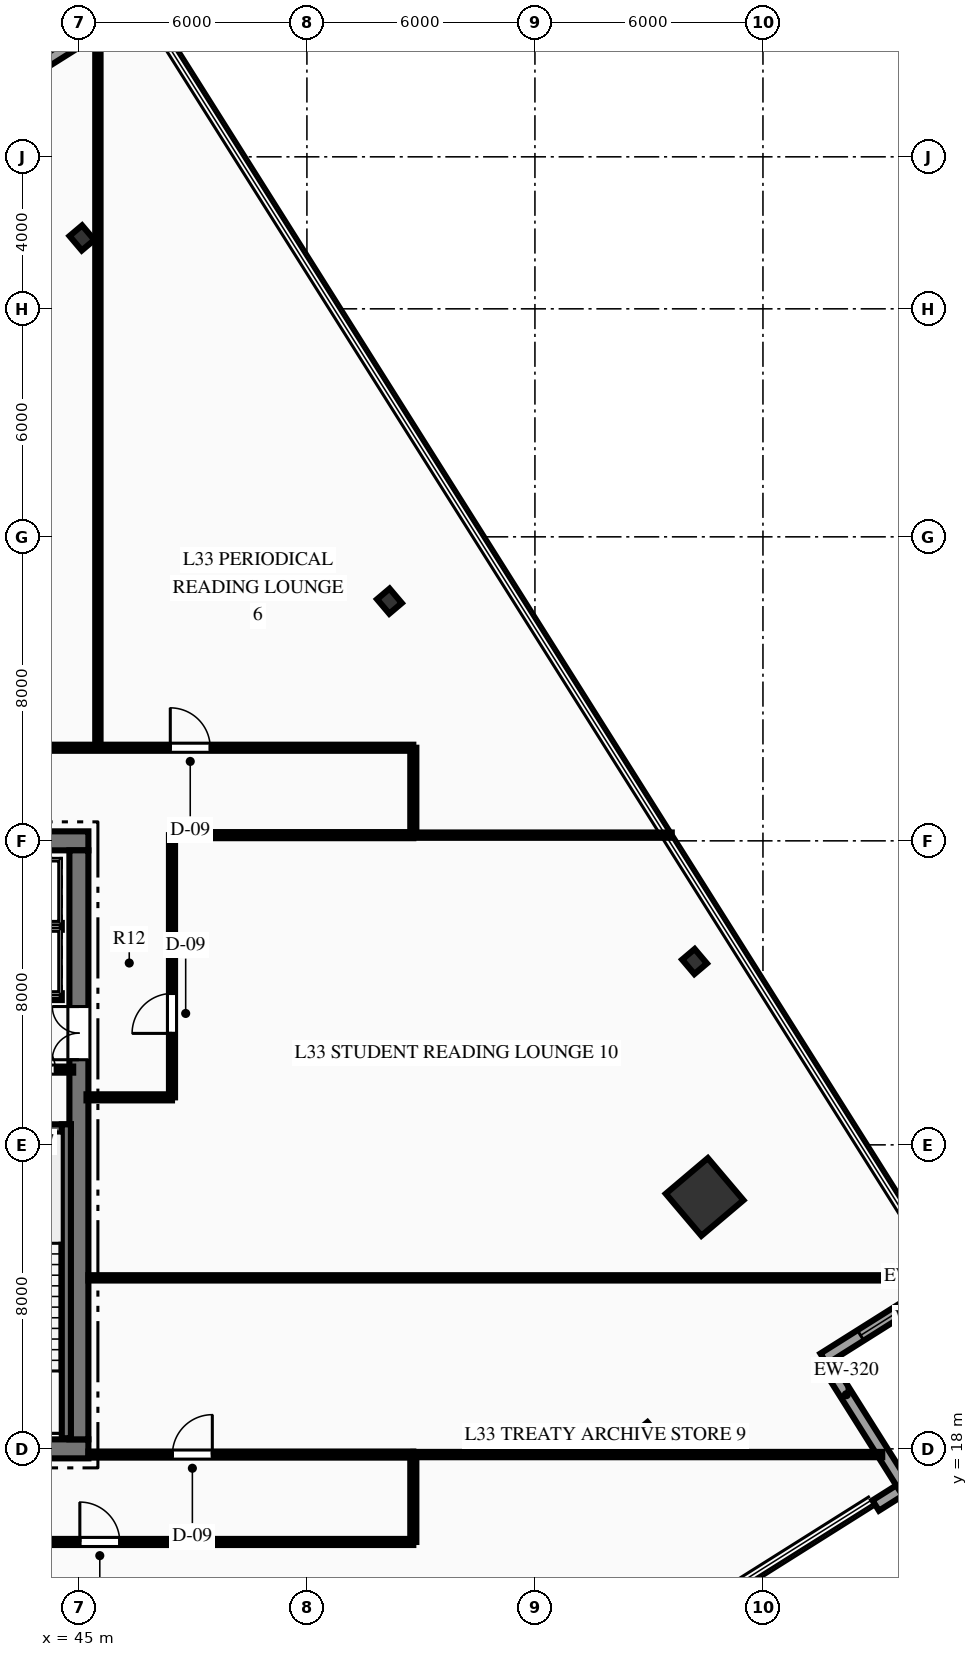
"""IFC4 building model, lengths in metres.
Left out: names, types, materials, properties, quantities, classifications, styles, units other than length and angle.
Written with IfcOpenShell. Run it as: python <this file> out.ifc"""

import sys

from ifc_helpers import new_model, si_unit, direction, frame, frame_2d, origin, origin_2d, place, context, subcontext, project, spatial, rectangle, hollow_rectangle, i_section, extrude, element, fill, save


model = new_model("IFC4")
c1 = context("Model", 3, precision=1e-05, world=origin(), true_north=direction((0.0, 1.0)))
c2 = subcontext(c1, "Body", "Model", "MODEL_VIEW")
j1 = project(units=[si_unit("LENGTHUNIT", "METRE"), si_unit("PLANEANGLEUNIT", "RADIAN")], contexts=[c1])
p1 = place(None, origin())
s1 = spatial("IfcSite", under=j1, at=p1, CompositionType="ELEMENT")
p2 = place(p1, origin())
s2 = spatial("IfcBuilding", under=s1, at=p2, CompositionType="ELEMENT")
p3 = place(p2, frame((0.0, 0.0, 136.2)))
s3 = spatial("IfcBuildingStorey", under=s2, at=p3, CompositionType="ELEMENT", Elevation=136.2)
p4 = place(p3, frame((26.75, 18.0, 0.0), z_axis=(0.0, 0.0, 1.0), x_axis=(1.0, 0.0, 0.0)))
e1 = element("IfcWall", 1, at=p4, inside=s3, PredefinedType="SHEAR", context=c2, shape_type="SweptSolid", body=[
    extrude(rectangle(XDim=18.5, YDim=0.5, at=frame_2d((9.25, 0.0))), origin(), (0.0, 0.0, 1.0), 4.5),
])
p5 = place(p4, frame((7.35, 0.0, 0.0)))
e2 = element("IfcOpeningElement", 2, at=p5, cuts=e1, PredefinedType="OPENING", context=c2, shape_type="SweptSolid", body=[
    extrude(rectangle(XDim=1.1, YDim=2.15, at=frame_2d((0.55, 1.075))), frame((0.0, 0.26, 0.0), z_axis=(0.0, -1.0, 0.0), x_axis=(1.0, 0.0, 0.0)), (0.0, 0.0, 1.0), 0.52),
])
p6 = place(p4, frame((10.05, 0.0, 0.0)))
e3 = element("IfcOpeningElement", 3, at=p6, cuts=e1, PredefinedType="OPENING", context=c2, shape_type="SweptSolid", body=[
    extrude(rectangle(XDim=1.1, YDim=2.15, at=frame_2d((0.55, 1.075))), frame((0.0, 0.26, 0.0), z_axis=(0.0, -1.0, 0.0), x_axis=(1.0, 0.0, 0.0)), (0.0, 0.0, 1.0), 0.52),
])
p7 = place(p3, frame((26.75, 34.0, 0.0), z_axis=(0.0, 0.0, 1.0), x_axis=(1.0, 0.0, 0.0)))
e4 = element("IfcWall", 4, at=p7, inside=s3, PredefinedType="SHEAR", context=c2, shape_type="SweptSolid", body=[
    extrude(rectangle(XDim=18.5, YDim=0.5, at=frame_2d((9.25, 0.0))), origin(), (0.0, 0.0, 1.0), 4.5),
])
p8 = place(p7, frame((13.935, 0.0, 0.0)))
e5 = element("IfcOpeningElement", 5, at=p8, cuts=e4, PredefinedType="OPENING", context=c2, shape_type="SweptSolid", body=[
    extrude(rectangle(XDim=1.1, YDim=2.15, at=frame_2d((0.55, 1.075))), frame((0.0, 0.26, 0.0), z_axis=(0.0, -1.0, 0.0), x_axis=(1.0, 0.0, 0.0)), (0.0, 0.0, 1.0), 0.52),
])
p9 = place(p7, frame((16.185, 0.0, 0.0)))
e6 = element("IfcOpeningElement", 6, at=p9, cuts=e4, PredefinedType="OPENING", context=c2, shape_type="SweptSolid", body=[
    extrude(rectangle(XDim=1.1, YDim=2.15, at=frame_2d((0.55, 1.075))), frame((0.0, 0.26, 0.0), z_axis=(0.0, -1.0, 0.0), x_axis=(1.0, 0.0, 0.0)), (0.0, 0.0, 1.0), 0.52),
])
p10 = place(p3, frame((45.0, 18.25, 0.0), z_axis=(0.0, 0.0, 1.0), x_axis=(0.0, 1.0, 0.0)))
e7 = element("IfcWall", 7, at=p10, inside=s3, PredefinedType="SHEAR", context=c2, shape_type="SweptSolid", body=[
    extrude(rectangle(XDim=15.5, YDim=0.5, at=frame_2d((7.75, 0.0))), origin(), (0.0, 0.0, 1.0), 4.5),
])
p11 = place(p10, frame((9.99, 0.0, 0.0)))
e8 = element("IfcOpeningElement", 8, at=p11, cuts=e7, PredefinedType="OPENING", context=c2, shape_type="SweptSolid", body=[
    extrude(rectangle(XDim=1.4, YDim=2.2, at=frame_2d((0.7, 1.1))), frame((0.0, 0.26, 0.0), z_axis=(0.0, -1.0, 0.0), x_axis=(1.0, 0.0, 0.0)), (0.0, 0.0, 1.0), 0.52),
])
p12 = place(p3, frame((40.81, 26.42, 0.0), z_axis=(0.0, 0.0, 1.0), x_axis=(1.0, 0.0, 0.0)))
e9 = element("IfcWall", 9, at=p12, inside=s3, PredefinedType="SHEAR", context=c2, shape_type="SweptSolid", body=[
    extrude(rectangle(XDim=3.98, YDim=0.24, at=frame_2d((1.99, 0.0))), origin(), (0.0, 0.0, 1.0), 4.5),
])
p13 = place(p3, frame((44.67, 18.28, 0.0), z_axis=(0.0, 0.0, 1.0), x_axis=(0.0, 1.0, 0.0)))
e10 = element("IfcWall", 10, at=p13, inside=s3, PredefinedType="SHEAR", context=c2, shape_type="SweptSolid", body=[
    extrude(rectangle(XDim=8.26, YDim=0.24, at=frame_2d((4.13, 0.0))), origin(), (0.0, 0.0, 1.0), 4.5),
])
p14 = place(p3, frame((61.465, 24.629, 0.0), z_axis=(0.0, 0.0, 1.0), x_axis=(0.763232469783, 0.646123979643, 0.0)))
e11 = element("IfcColumn", 11, at=p14, inside=s3, PredefinedType="COLUMN", context=c2, shape_type="SweptSolid", body=[
    extrude(hollow_rectangle(XDim=1.45, YDim=1.45, WallThickness=0.07, at=origin_2d()), origin(), (0.0, 0.0, 1.0), 4.5),
])
for number, where, z_axis, x_axis in (
    (12, (59.956, 18.373, 0.0), (0.0, 0.0, 1.0), (0.763, 0.646, 0.0)),
    (13, (61.199, 30.824, 0.0), (0.0, 0.0, 1.0), (0.763, 0.646, 0.0)),
    (14, (53.171, 40.307, 0.0), (0.0, 0.0, 1.0), (0.763, 0.646, 0.0)),
    (15, (45.08, 49.865, 0.0), (0.0, 0.0, 1.0), (0.763, 0.646, 0.0)),
):
    element("IfcColumn", number, at=place(p3, frame(where, z_axis=z_axis, x_axis=x_axis)), inside=s3, PredefinedType="COLUMN", context=c2, shape_type="SweptSolid", body=[
        extrude(i_section(OverallWidth=0.432, OverallDepth=0.498, WebThickness=0.056, FlangeThickness=0.089, at=origin_2d()), origin(), (0.0, 0.0, 1.0), 4.5),
    ])
p15 = place(p3, frame((66.728, 16.988, 0.0), z_axis=(0.0, 0.0, 1.0), x_axis=(-0.846210185892, -0.532849248186, 0.0)))
e16 = element("IfcWall", 16, at=p15, inside=s3, PredefinedType="STANDARD", context=c2, shape_type="SweptSolid", body=[
    extrude(rectangle(XDim=0.9, YDim=0.32, at=frame_2d((0.45, 0.0))), origin(), (0.0, 0.0, 1.0), 4.21),
])
p16 = place(p3, frame((64.597, 20.373, 0.0), z_axis=(0.0, 0.0, 1.0), x_axis=(0.532892588268, -0.846182893569, 0.0)))
e17 = element("IfcWall", 17, at=p16, inside=s3, PredefinedType="STANDARD", context=c2, shape_type="SweptSolid", body=[
    extrude(rectangle(XDim=4.0, YDim=0.32, at=frame_2d((2.0, 0.0))), origin(), (0.0, 0.0, 1.0), 4.21),
])
p17 = place(p3, frame((67.982, 22.505, 0.0), z_axis=(0.0, 0.0, 1.0), x_axis=(-0.846200224481, -0.532865067432, 0.0)))
e18 = element("IfcWall", 18, at=p17, inside=s3, PredefinedType="STANDARD", context=c2, shape_type="SweptSolid", body=[
    extrude(rectangle(XDim=4.0, YDim=0.32, at=frame_2d((2.0, 0.0))), origin(), (0.0, 0.0, 1.0), 4.21),
])
p18 = place(p17, frame((1.15, 0.0, 0.75)))
e19 = element("IfcOpeningElement", 19, at=p18, cuts=e18, PredefinedType="OPENING", context=c2, shape_type="SweptSolid", body=[
    extrude(rectangle(XDim=1.7, YDim=2.5, at=frame_2d((0.85, 1.25))), frame((0.0, 0.17, 0.0), z_axis=(0.0, -1.0, 0.0), x_axis=(1.0, 0.0, 0.0)), (0.0, 0.0, 1.0), 0.34),
])
p19 = place(p3, frame((43.388, 54.052, 0.0), z_axis=(0.0, 0.0, 1.0), x_axis=(0.846200224481, 0.532865067432, 0.0)))
e20 = element("IfcWall", 20, at=p19, inside=s3, PredefinedType="STANDARD", context=c2, shape_type="SweptSolid", body=[
    extrude(rectangle(XDim=4.0, YDim=0.32, at=frame_2d((2.0, 0.0))), origin(), (0.0, 0.0, 1.0), 4.21),
])
p20 = place(p3, frame((40.8, 27.98, 0.0), z_axis=(0.0, 0.0, 1.0), x_axis=(1.0, 0.0, 0.0)))
e21 = element("IfcWall", 21, at=p20, inside=s3, PredefinedType="PARTITIONING", context=c2, shape_type="SweptSolid", body=[
    extrude(rectangle(XDim=4.05, YDim=0.16, at=frame_2d((2.025, 0.0))), origin(), (0.0, 0.0, 1.0), 4.21),
])
p21 = place(p20, frame((0.77, 0.0, 0.0)))
e22 = element("IfcOpeningElement", 22, at=p21, cuts=e21, PredefinedType="OPENING", context=c2, shape_type="SweptSolid", body=[
    extrude(rectangle(XDim=0.9, YDim=2.15, at=frame_2d((0.45, 1.075))), frame((0.0, 0.09, 0.0), z_axis=(0.0, -1.0, 0.0), x_axis=(1.0, 0.0, 0.0)), (0.0, 0.0, 1.0), 0.18),
])
p22 = place(p20, frame((2.68, 0.0, 0.0)))
e23 = element("IfcOpeningElement", 23, at=p22, cuts=e21, PredefinedType="OPENING", context=c2, shape_type="SweptSolid", body=[
    extrude(rectangle(XDim=0.9, YDim=2.15, at=frame_2d((0.45, 1.075))), frame((0.0, 0.09, 0.0), z_axis=(0.0, -1.0, 0.0), x_axis=(1.0, 0.0, 0.0)), (0.0, 0.0, 1.0), 0.18),
])
p23 = place(p3, frame((40.12, 29.9, 0.0), z_axis=(0.0, 0.0, 1.0), x_axis=(1.0, 0.0, 0.0)))
e24 = element("IfcWall", 24, at=p23, inside=s3, PredefinedType="PARTITIONING", context=c2, shape_type="SweptSolid", body=[
    extrude(rectangle(XDim=4.43, YDim=0.18, at=frame_2d((2.215, 0.0))), origin(), (0.0, 0.0, 1.0), 4.21),
])
p24 = place(p23, frame((0.565, 0.0, 0.0)))
e25 = element("IfcOpeningElement", 25, at=p24, cuts=e24, PredefinedType="OPENING", context=c2, shape_type="SweptSolid", body=[
    extrude(rectangle(XDim=1.1, YDim=2.15, at=frame_2d((0.55, 1.075))), frame((0.0, 0.1, 0.0), z_axis=(0.0, -1.0, 0.0), x_axis=(1.0, 0.0, 0.0)), (0.0, 0.0, 1.0), 0.2),
])
p25 = place(p23, frame((2.815, 0.0, 0.0)))
e26 = element("IfcOpeningElement", 26, at=p25, cuts=e24, PredefinedType="OPENING", context=c2, shape_type="SweptSolid", body=[
    extrude(rectangle(XDim=1.1, YDim=2.15, at=frame_2d((0.55, 1.075))), frame((0.0, 0.1, 0.0), z_axis=(0.0, -1.0, 0.0), x_axis=(1.0, 0.0, 0.0)), (0.0, 0.0, 1.0), 0.2),
])
p26 = place(p3, frame((40.12, 31.75, 0.0), z_axis=(0.0, 0.0, 1.0), x_axis=(1.0, 0.0, 0.0)))
e27 = element("IfcWall", 27, at=p26, inside=s3, PredefinedType="PARTITIONING", context=c2, shape_type="SweptSolid", body=[
    extrude(rectangle(XDim=4.43, YDim=0.18, at=frame_2d((2.215, 0.0))), origin(), (0.0, 0.0, 1.0), 4.21),
])
p27 = place(p3, frame((18.2, 15.55, 0.0), z_axis=(0.0, 0.0, 1.0), x_axis=(1.0, 0.0, 0.0)))
e28 = element("IfcWall", 28, at=p27, inside=s3, PredefinedType="PARTITIONING", context=c2, shape_type="SweptSolid", body=[
    extrude(rectangle(XDim=35.6, YDim=0.16, at=frame_2d((17.8, 0.0))), origin(), (0.0, 0.0, 1.0), 4.21),
])
p28 = place(p27, frame((7.55, 0.0, 0.0)))
e29 = element("IfcOpeningElement", 29, at=p28, cuts=e28, PredefinedType="OPENING", context=c2, shape_type="SweptSolid", body=[
    extrude(rectangle(XDim=0.9, YDim=2.15, at=frame_2d((0.45, 1.075))), frame((0.0, 0.09, 0.0), z_axis=(0.0, -1.0, 0.0), x_axis=(1.0, 0.0, 0.0)), (0.0, 0.0, 1.0), 0.18),
])
p29 = place(p27, frame((9.85, 0.0, 0.0)))
e30 = element("IfcOpeningElement", 30, at=p29, cuts=e28, PredefinedType="OPENING", context=c2, shape_type="SweptSolid", body=[
    extrude(rectangle(XDim=0.9, YDim=2.15, at=frame_2d((0.45, 1.075))), frame((0.0, 0.09, 0.0), z_axis=(0.0, -1.0, 0.0), x_axis=(1.0, 0.0, 0.0)), (0.0, 0.0, 1.0), 0.18),
])
p30 = place(p27, frame((12.1, 0.0, 0.0)))
e31 = element("IfcOpeningElement", 31, at=p30, cuts=e28, PredefinedType="OPENING", context=c2, shape_type="SweptSolid", body=[
    extrude(rectangle(XDim=1.0, YDim=2.15, at=frame_2d((0.5, 1.075))), frame((0.0, 0.09, 0.0), z_axis=(0.0, -1.0, 0.0), x_axis=(1.0, 0.0, 0.0)), (0.0, 0.0, 1.0), 0.18),
])
p31 = place(p27, frame((16.335, 0.0, 0.0)))
e32 = element("IfcOpeningElement", 32, at=p31, cuts=e28, PredefinedType="OPENING", context=c2, shape_type="SweptSolid", body=[
    extrude(rectangle(XDim=1.05, YDim=2.15, at=frame_2d((0.525, 1.075))), frame((0.0, 0.09, 0.0), z_axis=(0.0, -1.0, 0.0), x_axis=(1.0, 0.0, 0.0)), (0.0, 0.0, 1.0), 0.18),
])
p32 = place(p27, frame((26.825, 0.0, 0.0)))
e33 = element("IfcOpeningElement", 33, at=p32, cuts=e28, PredefinedType="OPENING", context=c2, shape_type="SweptSolid", body=[
    extrude(rectangle(XDim=1.05, YDim=2.15, at=frame_2d((0.525, 1.075))), frame((0.0, 0.09, 0.0), z_axis=(0.0, -1.0, 0.0), x_axis=(1.0, 0.0, 0.0)), (0.0, 0.0, 1.0), 0.18),
])
p33 = place(p3, frame((45.25, 17.85, 0.0), z_axis=(0.0, 0.0, 1.0), x_axis=(1.0, 0.0, 0.0)))
e34 = element("IfcWall", 34, at=p33, inside=s3, PredefinedType="PARTITIONING", context=c2, shape_type="SweptSolid", body=[
    extrude(rectangle(XDim=8.55, YDim=0.16, at=frame_2d((4.275, 0.0))), origin(), (0.0, 0.0, 1.0), 3.748),
])
p34 = place(p33, frame((2.211, 0.0, 0.0)))
e35 = element("IfcOpeningElement", 35, at=p34, cuts=e34, PredefinedType="OPENING", context=c2, shape_type="SweptSolid", body=[
    extrude(rectangle(XDim=1.05, YDim=2.15, at=frame_2d((0.525, 1.075))), frame((0.0, 0.09, 0.0), z_axis=(0.0, -1.0, 0.0), x_axis=(1.0, 0.0, 0.0)), (0.0, 0.0, 1.0), 0.18),
])
p35 = place(p3, frame((18.2, 36.45, 0.0), z_axis=(0.0, 0.0, 1.0), x_axis=(1.0, 0.0, 0.0)))
e36 = element("IfcWall", 36, at=p35, inside=s3, PredefinedType="PARTITIONING", context=c2, shape_type="SweptSolid", body=[
    extrude(rectangle(XDim=35.6, YDim=0.16, at=frame_2d((17.8, 0.0))), origin(), (0.0, 0.0, 1.0), 4.21),
])
p36 = place(p35, frame((1.437, 0.0, 0.0)))
e37 = element("IfcOpeningElement", 37, at=p36, cuts=e36, PredefinedType="OPENING", context=c2, shape_type="SweptSolid", body=[
    extrude(rectangle(XDim=1.05, YDim=2.15, at=frame_2d((0.525, 1.075))), frame((0.0, 0.09, 0.0), z_axis=(0.0, -1.0, 0.0), x_axis=(1.0, 0.0, 0.0)), (0.0, 0.0, 1.0), 0.18),
])
p37 = place(p35, frame((12.535, 0.0, 0.0)))
e38 = element("IfcOpeningElement", 38, at=p37, cuts=e36, PredefinedType="OPENING", context=c2, shape_type="SweptSolid", body=[
    extrude(rectangle(XDim=1.05, YDim=2.15, at=frame_2d((0.525, 1.075))), frame((0.0, 0.09, 0.0), z_axis=(0.0, -1.0, 0.0), x_axis=(1.0, 0.0, 0.0)), (0.0, 0.0, 1.0), 0.18),
])
p38 = place(p35, frame((19.175, 0.0, 0.0)))
e39 = element("IfcOpeningElement", 39, at=p38, cuts=e36, PredefinedType="OPENING", context=c2, shape_type="SweptSolid", body=[
    extrude(rectangle(XDim=1.05, YDim=2.15, at=frame_2d((0.525, 1.075))), frame((0.0, 0.09, 0.0), z_axis=(0.0, -1.0, 0.0), x_axis=(1.0, 0.0, 0.0)), (0.0, 0.0, 1.0), 0.18),
])
p39 = place(p35, frame((29.205, 0.0, 0.0)))
e40 = element("IfcOpeningElement", 40, at=p39, cuts=e36, PredefinedType="OPENING", context=c2, shape_type="SweptSolid", body=[
    extrude(rectangle(XDim=1.05, YDim=2.15, at=frame_2d((0.525, 1.075))), frame((0.0, 0.09, 0.0), z_axis=(0.0, -1.0, 0.0), x_axis=(1.0, 0.0, 0.0)), (0.0, 0.0, 1.0), 0.18),
])
p40 = place(p3, frame((47.45, 34.15, 0.0), z_axis=(0.0, 0.0, 1.0), x_axis=(1.0, 0.0, 0.0)))
e41 = element("IfcWall", 41, at=p40, inside=s3, PredefinedType="PARTITIONING", context=c2, shape_type="SweptSolid", body=[
    extrude(rectangle(XDim=6.35, YDim=0.16, at=frame_2d((3.175, 0.0))), origin(), (0.0, 0.0, 1.0), 4.21),
])
p41 = place(p3, frame((47.45, 27.25, 0.0), z_axis=(0.0, 0.0, 1.0), x_axis=(0.0, 1.0, 0.0)))
e42 = element("IfcWall", 42, at=p41, inside=s3, PredefinedType="PARTITIONING", context=c2, shape_type="SweptSolid", body=[
    extrude(rectangle(XDim=6.9, YDim=0.16, at=frame_2d((3.45, 0.0))), origin(), (0.0, 0.0, 1.0), 4.21),
])
p42 = place(p41, frame((1.683, 0.0, 0.0)))
e43 = element("IfcOpeningElement", 43, at=p42, cuts=e42, PredefinedType="OPENING", context=c2, shape_type="SweptSolid", body=[
    extrude(rectangle(XDim=1.05, YDim=2.15, at=frame_2d((0.525, 1.075))), frame((0.0, 0.09, 0.0), z_axis=(0.0, -1.0, 0.0), x_axis=(1.0, 0.0, 0.0)), (0.0, 0.0, 1.0), 0.18),
])
p43 = place(p3, frame((45.2, 27.25, 0.0), z_axis=(0.0, 0.0, 1.0), x_axis=(1.0, 0.0, 0.0)))
e44 = element("IfcWall", 44, at=p43, inside=s3, PredefinedType="PARTITIONING", context=c2, shape_type="SweptSolid", body=[
    extrude(rectangle(XDim=2.25, YDim=0.16, at=frame_2d((1.125, 0.0))), origin(), (0.0, 0.0, 1.0), 4.21),
])
for number, where, z_axis, x_axis in (
    (45, (53.8, 15.55, 0.0), (0.0, 0.0, 1.0), (0.0, 1.0, 0.0)),
    (46, (53.8, 34.15, 0.0), (0.0, 0.0, 1.0), (0.0, 1.0, 0.0)),
):
    element("IfcWall", number, at=place(p3, frame(where, z_axis=z_axis, x_axis=x_axis)), inside=s3, PredefinedType="PARTITIONING", context=c2, shape_type="SweptSolid", body=[
        extrude(rectangle(XDim=2.3, YDim=0.16, at=frame_2d((1.15, 0.0))), origin(), (0.0, 0.0, 1.0), 4.21),
    ])
p44 = place(p3, frame((53.8, 17.85, 0.0), z_axis=(0.0, 0.0, 1.0), x_axis=(1.0, 0.0, 0.0)))
e47 = element("IfcWall", 47, at=p44, inside=s3, PredefinedType="PARTITIONING", context=c2, shape_type="SweptSolid", body=[
    extrude(rectangle(XDim=12.338, YDim=0.14, at=frame_2d((6.169, 0.0))), origin(), (0.0, 0.0, 1.0), 4.21),
])
p45 = place(p3, frame((53.8, 34.15, 0.0), z_axis=(0.0, 0.0, 1.0), x_axis=(1.0, 0.0, 0.0)))
e48 = element("IfcWall", 48, at=p45, inside=s3, PredefinedType="PARTITIONING", context=c2, shape_type="SweptSolid", body=[
    extrude(rectangle(XDim=6.801, YDim=0.14, at=frame_2d((3.4, 0.0))), origin(), (0.0, 0.0, 1.0), 4.21),
])
p46 = place(p3, frame((45.5, 36.45, 0.0), z_axis=(0.0, 0.0, 1.0), x_axis=(0.0, 1.0, 0.0)))
e49 = element("IfcWall", 49, at=p46, inside=s3, PredefinedType="PARTITIONING", context=c2, shape_type="SweptSolid", body=[
    extrude(rectangle(XDim=18.884, YDim=0.14, at=frame_2d((9.442, 0.0))), origin(), (0.0, 0.0, 1.0), 4.21),
])
p47 = place(p3, frame((45.25, 22.5, 0.0), z_axis=(0.0, 0.0, 1.0), x_axis=(1.0, 0.0, 0.0)))
e50 = element("IfcWall", 50, at=p47, inside=s3, PredefinedType="PARTITIONING", context=c2, shape_type="SweptSolid", body=[
    extrude(rectangle(XDim=22.649, YDim=0.14, at=frame_2d((11.325, 0.0))), origin(), (0.0, 0.0, 1.0), 4.21),
])
p48 = place(p18, origin())
e51 = element("IfcWindow", 51, at=p48, inside=s3, PartitioningType="SINGLE_PANEL", PredefinedType="WINDOW", context=c2, shape_type="SweptSolid", body=[
    extrude(rectangle(XDim=1.7, YDim=2.5, at=frame_2d((0.85, 1.25))), frame((0.0, 0.03, 0.0), z_axis=(0.0, -1.0, 0.0), x_axis=(1.0, 0.0, 0.0)), (0.0, 0.0, 1.0), 0.06),
])
fill(e19, e51)
p49 = place(p22, origin())
e52 = element("IfcDoor", 52, at=p49, inside=s3, OperationType="SINGLE_SWING_LEFT", PredefinedType="DOOR", context=c2, shape_type="SweptSolid", body=[
    extrude(rectangle(XDim=0.9, YDim=2.15, at=frame_2d((0.45, 1.075))), frame((0.0, 0.025, 0.0), z_axis=(0.0, -1.0, 0.0), x_axis=(1.0, 0.0, 0.0)), (0.0, 0.0, 1.0), 0.05),
])
fill(e23, e52)
p50 = place(p11, origin())
e53 = element("IfcDoor", 53, at=p50, inside=s3, OperationType="DOUBLE_DOOR_SINGLE_SWING", PredefinedType="DOOR", context=c2, shape_type="SweptSolid", body=[
    extrude(rectangle(XDim=1.4, YDim=2.2, at=frame_2d((0.7, 1.1))), frame((0.0, 0.025, 0.0), z_axis=(0.0, -1.0, 0.0), x_axis=(1.0, 0.0, 0.0)), (0.0, 0.0, 1.0), 0.05),
])
fill(e8, e53)
p51 = place(p32, origin())
e54 = element("IfcDoor", 54, at=p51, inside=s3, OperationType="SINGLE_SWING_LEFT", PredefinedType="DOOR", context=c2, shape_type="SweptSolid", body=[
    extrude(rectangle(XDim=1.05, YDim=2.15, at=frame_2d((0.525, 1.075))), frame((0.0, 0.025, 0.0), z_axis=(0.0, -1.0, 0.0), x_axis=(1.0, 0.0, 0.0)), (0.0, 0.0, 1.0), 0.05),
])
fill(e33, e54)
p52 = place(p39, origin())
e55 = element("IfcDoor", 55, at=p52, inside=s3, OperationType="SINGLE_SWING_LEFT", PredefinedType="DOOR", context=c2, shape_type="SweptSolid", body=[
    extrude(rectangle(XDim=1.05, YDim=2.15, at=frame_2d((0.525, 1.075))), frame((0.0, 0.025, 0.0), z_axis=(0.0, -1.0, 0.0), x_axis=(1.0, 0.0, 0.0)), (0.0, 0.0, 1.0), 0.05),
])
fill(e40, e55)
p53 = place(p34, origin())
e56 = element("IfcDoor", 56, at=p53, inside=s3, OperationType="SINGLE_SWING_RIGHT", PredefinedType="DOOR", context=c2, shape_type="SweptSolid", body=[
    extrude(rectangle(XDim=1.05, YDim=2.15, at=frame_2d((0.525, 1.075))), frame((0.0, 0.025, 0.0), z_axis=(0.0, -1.0, 0.0), x_axis=(1.0, 0.0, 0.0)), (0.0, 0.0, 1.0), 0.05),
])
fill(e35, e56)
p54 = place(p42, origin())
e57 = element("IfcDoor", 57, at=p54, inside=s3, OperationType="SINGLE_SWING_LEFT", PredefinedType="DOOR", context=c2, shape_type="SweptSolid", body=[
    extrude(rectangle(XDim=1.05, YDim=2.15, at=frame_2d((0.525, 1.075))), frame((0.0, 0.025, 0.0), z_axis=(0.0, -1.0, 0.0), x_axis=(1.0, 0.0, 0.0)), (0.0, 0.0, 1.0), 0.05),
])
fill(e43, e57)
save(model, sys.argv[1])
